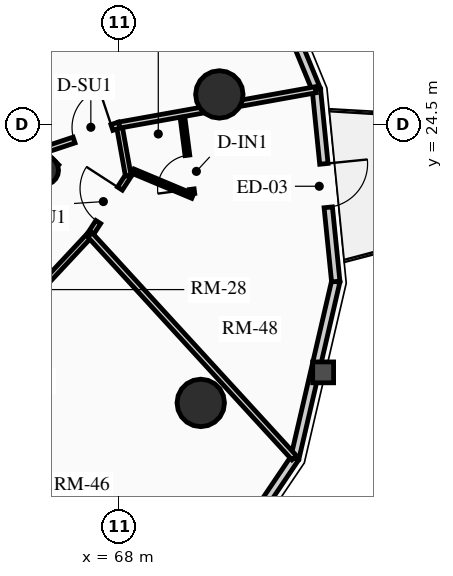
"""IFC4 building model, lengths in metres.
Left out: names, types, materials, properties, quantities, classifications, styles, units other than length and angle.
Written with IfcOpenShell. Run it as: python <this file> out.ifc"""

import sys

from ifc_helpers import new_model, si_unit, direction, frame, frame_2d, origin, origin_2d, place, context, subcontext, project, spatial, rectangle, circle, hollow_circle, extrude, source, transform, mapped, element, fill, save


model = new_model("IFC4")
c1 = context("Model", 3, precision=1e-05, world=origin(), true_north=direction((0.0, 1.0)))
c2 = subcontext(c1, "Body", "Model", "MODEL_VIEW")
j1 = project(units=[si_unit("LENGTHUNIT", "METRE"), si_unit("PLANEANGLEUNIT", "RADIAN")], contexts=[c1])
p1 = place(None, origin())
s1 = spatial("IfcSite", under=j1, at=p1, CompositionType="ELEMENT")
p2 = place(p1, origin())
s2 = spatial("IfcBuilding", under=s1, at=p2, CompositionType="ELEMENT")
p3 = place(p2, frame((0.0, 0.0, 154.51)))
s3 = spatial("IfcBuildingStorey", under=s2, at=p3, CompositionType="ELEMENT", Elevation=154.51)
p4 = place(p3, frame((66.268, 23.298, 0.0), z_axis=(0.0, 0.0, 1.0), x_axis=(-0.707106781187, 0.707106781187, 0.0)))
e1 = element("IfcWall", 1, at=p4, inside=s3, PredefinedType="SHEAR", context=c2, shape_type="SweptSolid", body=[
    extrude(rectangle(XDim=14.1, YDim=0.4, at=frame_2d((7.05, 0.0))), origin(), (0.0, 0.0, 1.0), 2.91),
])
p5 = place(p3, frame((58.561, 15.873, 0.0), z_axis=(0.0, 0.0, 1.0), x_axis=(0.707106781187, 0.707106781187, 0.0)))
e2 = element("IfcWall", 2, at=p5, inside=s3, PredefinedType="SHEAR", context=c2, shape_type="SweptSolid", body=[
    extrude(rectangle(XDim=10.7, YDim=0.4, at=frame_2d((5.35, 0.0))), origin(), (0.0, 0.0, 1.0), 2.91),
])
m1 = source(origin(), c2, "Body", "SweptSolid", [
    extrude(rectangle(XDim=1.5, YDim=2.02, at=frame_2d((0.75, 1.01))), frame((0.0, 0.21, 0.0), z_axis=(0.0, -1.0, 0.0), x_axis=(1.0, 0.0, 0.0)), (0.0, 0.0, 1.0), 0.42),
])
p6 = place(p5, frame((5.45, 0.0, 0.0)))
e3 = element("IfcOpeningElement", 3, at=p6, cuts=e2, PredefinedType="OPENING", context=c2, shape_type="MappedRepresentation", body=[
    mapped(m1, transform((0.0, 0.0, 0.0), x_axis=(1.0, 0.0, 0.0), y_axis=(0.0, 1.0, 0.0), z_axis=(0.0, 0.0, 1.0), scale=1.0)),
])
p7 = place(p3, frame((66.024, 23.294, 0.0), z_axis=(0.0, 0.0, 1.0), x_axis=(0.707106781187, 0.707106781187, 0.0)))
e4 = element("IfcColumn", 4, at=p7, inside=s3, PredefinedType="COLUMN", context=c2, shape_type="SweptSolid", body=[
    extrude(hollow_circle(Radius=0.38, WallThickness=0.032, at=origin_2d()), origin(), (0.0, 0.0, 1.0), 2.91),
])
for number, where, z_axis, x_axis in (
    (5, (70.146, 17.173, 0.0), (0.0, 0.0, 1.0), (1.0, 0.0, 0.0)),
    (6, (70.635, 25.291, 0.0), (0.0, 0.0, 1.0), (1.0, 0.0, 0.0)),
):
    element("IfcColumn", number, at=place(p3, frame(where, z_axis=z_axis, x_axis=x_axis)), inside=s3, PredefinedType="USERDEFINED", context=c2, shape_type="SweptSolid", body=[
        extrude(circle(Radius=0.625, at=origin_2d()), origin(), (0.0, 0.0, 1.0), 2.91),
    ])
p8 = place(p3, frame((72.622, 15.721, 0.0), z_axis=(0.0, 0.0, 1.0), x_axis=(-0.559635286042, -0.828739009952, 0.0)))
e7 = element("IfcWall", 7, at=p8, inside=s3, PredefinedType="SOLIDWALL", context=c2, shape_type="SweptSolid", body=[
    extrude(rectangle(XDim=4.569, YDim=0.22, at=frame_2d((2.284, 0.0))), origin(), (0.0, 0.0, 1.0), 2.245),
])
m2 = source(origin(), c2, "Body", "SweptSolid", [
    extrude(rectangle(XDim=1.6, YDim=1.3, at=frame_2d((0.8, 0.65))), frame((0.0, 0.12, 0.0), z_axis=(0.0, -1.0, 0.0), x_axis=(1.0, 0.0, 0.0)), (0.0, 0.0, 1.0), 0.24),
])
p9 = place(p8, frame((1.484, 0.0, 0.65)))
e8 = element("IfcOpeningElement", 8, at=p9, cuts=e7, PredefinedType="OPENING", context=c2, shape_type="MappedRepresentation", body=[
    mapped(m2, transform((0.0, 0.0, 0.0), x_axis=(1.0, 0.0, 0.0), y_axis=(0.0, 1.0, 0.0), z_axis=(0.0, 0.0, 1.0), scale=1.0)),
])
p10 = place(p3, frame((73.698, 20.367, 0.0), z_axis=(0.0, 0.0, 1.0), x_axis=(-0.225659540039, -0.974206226622, 0.0)))
e9 = element("IfcWall", 9, at=p10, inside=s3, PredefinedType="SOLIDWALL", context=c2, shape_type="SweptSolid", body=[
    extrude(rectangle(XDim=4.769, YDim=0.22, at=frame_2d((2.385, 0.0))), origin(), (0.0, 0.0, 1.0), 2.245),
])
p11 = place(p3, frame((73.189, 25.418, 0.0), z_axis=(0.0, 0.0, 1.0), x_axis=(0.100279889424, -0.994959267396, 0.0)))
e10 = element("IfcWall", 10, at=p11, inside=s3, PredefinedType="SOLIDWALL", context=c2, shape_type="SweptSolid", body=[
    extrude(rectangle(XDim=5.076, YDim=0.22, at=frame_2d((2.538, 0.0))), origin(), (0.0, 0.0, 1.0), 2.245),
])
m3 = source(origin(), c2, "Body", "SweptSolid", [
    extrude(rectangle(XDim=1.15, YDim=2.005, at=frame_2d((0.575, 1.002))), frame((0.0, 0.12, 0.0), z_axis=(0.0, -1.0, 0.0), x_axis=(1.0, 0.0, 0.0)), (0.0, 0.0, 1.0), 0.24),
])
p12 = place(p11, frame((1.963, 0.0, 0.0)))
e11 = element("IfcOpeningElement", 11, at=p12, cuts=e10, PredefinedType="OPENING", context=c2, shape_type="MappedRepresentation", body=[
    mapped(m3, transform((0.0, 0.0, 0.0), x_axis=(1.0, 0.0, 0.0), y_axis=(0.0, 1.0, 0.0), z_axis=(0.0, 0.0, 1.0), scale=1.0)),
])
p13 = place(p3, frame((71.144, 30.378, 0.0), z_axis=(0.0, 0.0, 1.0), x_axis=(0.38111364655, -0.924528197738, 0.0)))
e12 = element("IfcWall", 12, at=p13, inside=s3, PredefinedType="SOLIDWALL", context=c2, shape_type="SweptSolid", body=[
    extrude(rectangle(XDim=5.366, YDim=0.22, at=frame_2d((2.683, 0.0))), origin(), (0.0, 0.0, 1.0), 2.245),
])
p14 = place(p3, frame((62.784, 16.83, 0.0), z_axis=(0.0, 0.0, 1.0), x_axis=(0.682240832942, 0.731127516831, 0.0)))
e13 = element("IfcWall", 13, at=p14, inside=s3, PredefinedType="PARTITIONING", context=c2, shape_type="SweptSolid", body=[
    extrude(rectangle(XDim=6.517, YDim=0.15, at=frame_2d((3.259, 0.0))), origin(), (0.0, 0.0, 1.0), 2.245),
])
m4 = source(origin(), c2, "Body", "SweptSolid", [
    extrude(rectangle(XDim=1.05, YDim=2.015, at=frame_2d((0.525, 1.007))), frame((0.0, 0.085, 0.0), z_axis=(0.0, -1.0, 0.0), x_axis=(1.0, 0.0, 0.0)), (0.0, 0.0, 1.0), 0.17),
])
p15 = place(p14, frame((2.734, 0.0, 0.0)))
e14 = element("IfcOpeningElement", 14, at=p15, cuts=e13, PredefinedType="OPENING", context=c2, shape_type="MappedRepresentation", body=[
    mapped(m4, transform((0.0, 0.0, 0.0), x_axis=(1.0, 0.0, 0.0), y_axis=(0.0, 1.0, 0.0), z_axis=(0.0, 0.0, 1.0), scale=1.0)),
])
p16 = place(p3, frame((67.23, 21.595, 0.0), z_axis=(0.0, 0.0, 1.0), x_axis=(0.543687770222, 0.839287560084, 0.0)))
e15 = element("IfcWall", 15, at=p16, inside=s3, PredefinedType="PARTITIONING", context=c2, shape_type="SweptSolid", body=[
    extrude(rectangle(XDim=1.855, YDim=0.15, at=frame_2d((0.927, 0.0))), origin(), (0.0, 0.0, 1.0), 2.245),
])
p17 = place(p16, frame((0.402, 0.0, 0.0)))
e16 = element("IfcOpeningElement", 16, at=p17, cuts=e15, PredefinedType="OPENING", context=c2, shape_type="MappedRepresentation", body=[
    mapped(m4, transform((0.0, 0.0, 0.0), x_axis=(1.0, 0.0, 0.0), y_axis=(0.0, 1.0, 0.0), z_axis=(0.0, 0.0, 1.0), scale=1.0)),
])
p18 = place(p3, frame((68.239, 23.152, 0.0), z_axis=(0.0, 0.0, 1.0), x_axis=(-0.177076146115, 0.984197154272, 0.0)))
e17 = element("IfcWall", 17, at=p18, inside=s3, PredefinedType="PARTITIONING", context=c2, shape_type="SweptSolid", body=[
    extrude(rectangle(XDim=1.354, YDim=0.15, at=frame_2d((0.677, 0.0))), origin(), (0.0, 0.0, 1.0), 2.245),
])
p19 = place(p3, frame((67.23, 21.595, 0.0), z_axis=(0.0, 0.0, 1.0), x_axis=(0.67560509773, -0.737263692258, 0.0)))
e18 = element("IfcWall", 18, at=p19, inside=s3, PredefinedType="PARTITIONING", context=c2, shape_type="SweptSolid", body=[
    extrude(rectangle(XDim=7.955, YDim=0.16, at=frame_2d((3.978, 0.0))), origin(), (0.0, 0.0, 1.0), 2.245),
])
p20 = place(p3, frame((67.999, 24.485, 0.0), z_axis=(0.0, 0.0, 1.0), x_axis=(0.984209402602, 0.177008055834, 0.0)))
e19 = element("IfcWall", 19, at=p20, inside=s3, PredefinedType="PARTITIONING", context=c2, shape_type="SweptSolid", body=[
    extrude(rectangle(XDim=5.254, YDim=0.16, at=frame_2d((2.627, 0.0))), origin(), (0.0, 0.0, 1.0), 2.245),
])
p21 = place(p3, frame((66.021, 23.828, 0.0), z_axis=(0.0, 0.0, 1.0), x_axis=(0.949104122534, 0.314962481241, 0.0)))
e20 = element("IfcWall", 20, at=p21, inside=s3, PredefinedType="PARTITIONING", context=c2, shape_type="SweptSolid", body=[
    extrude(rectangle(XDim=2.084, YDim=0.16, at=frame_2d((1.042, 0.0))), origin(), (0.0, 0.0, 1.0), 2.245),
])
m5 = source(origin(), c2, "Body", "SweptSolid", [
    extrude(rectangle(XDim=1.05, YDim=2.015, at=frame_2d((0.525, 1.007))), frame((0.0, 0.09, 0.0), z_axis=(0.0, -1.0, 0.0), x_axis=(1.0, 0.0, 0.0)), (0.0, 0.0, 1.0), 0.18),
])
p22 = place(p21, frame((0.834, 0.0, 0.0)))
e21 = element("IfcOpeningElement", 21, at=p22, cuts=e20, PredefinedType="OPENING", context=c2, shape_type="MappedRepresentation", body=[
    mapped(m5, transform((0.0, 0.0, 0.0), x_axis=(1.0, 0.0, 0.0), y_axis=(0.0, 1.0, 0.0), z_axis=(0.0, 0.0, 1.0), scale=1.0)),
])
p23 = place(p3, frame((68.367, 23.271, 0.0), z_axis=(0.0, 0.0, 1.0), x_axis=(0.922420747941, -0.386186436541, 0.0)))
e22 = element("IfcWall", 22, at=p23, inside=s3, PredefinedType="PARTITIONING", context=c2, shape_type="SweptSolid", body=[
    extrude(rectangle(XDim=1.699, YDim=0.125, at=frame_2d((0.849, 0.0))), origin(), (0.0, 0.0, 1.0), 2.675),
])
p24 = place(p3, frame((69.926, 22.678, 0.0), z_axis=(0.0, 0.0, 1.0), x_axis=(-0.128245661315, 0.991742431458, 0.0)))
e23 = element("IfcWall", 23, at=p24, inside=s3, PredefinedType="PARTITIONING", context=c2, shape_type="SweptSolid", body=[
    extrude(rectangle(XDim=2.033, YDim=0.125, at=frame_2d((1.017, 0.0))), origin(), (0.0, 0.0, 1.0), 2.675),
])
m6 = source(origin(), c2, "Body", "SweptSolid", [
    extrude(rectangle(XDim=0.9, YDim=2.005, at=frame_2d((0.45, 1.002))), frame((0.0, 0.073, 0.0), z_axis=(0.0, -1.0, 0.0), x_axis=(1.0, 0.0, 0.0)), (0.0, 0.0, 1.0), 0.145),
])
p25 = place(p24, frame((0.12, 0.0, 0.0)))
e24 = element("IfcOpeningElement", 24, at=p25, cuts=e23, PredefinedType="OPENING", context=c2, shape_type="MappedRepresentation", body=[
    mapped(m6, transform((0.0, 0.0, 0.0), x_axis=(1.0, 0.0, 0.0), y_axis=(0.0, 1.0, 0.0), z_axis=(0.0, 0.0, 1.0), scale=1.0)),
])
m7 = source(origin(), c2, "Body", "SweptSolid", [
    extrude(rectangle(XDim=1.15, YDim=2.005, at=frame_2d((0.575, 1.002))), frame((0.0, 0.025, 0.0), z_axis=(0.0, -1.0, 0.0), x_axis=(1.0, 0.0, 0.0)), (0.0, 0.0, 1.0), 0.05),
])
p26 = place(p12, origin())
e25 = element("IfcDoor", 25, at=p26, inside=s3, OperationType="SINGLE_SWING_LEFT", PredefinedType="DOOR", context=c2, shape_type="MappedRepresentation", body=[
    mapped(m7, transform((0.0, 0.0, 0.0), x_axis=(1.0, 0.0, 0.0), y_axis=(0.0, 1.0, 0.0), z_axis=(0.0, 0.0, 1.0), scale=1.0)),
])
fill(e11, e25)
m8 = source(origin(), c2, "Body", "SweptSolid", [
    extrude(rectangle(XDim=1.05, YDim=2.015, at=frame_2d((0.525, 1.007))), frame((0.0, 0.025, 0.0), z_axis=(0.0, -1.0, 0.0), x_axis=(1.0, 0.0, 0.0)), (0.0, 0.0, 1.0), 0.05),
])
p27 = place(p22, origin())
e26 = element("IfcDoor", 26, at=p27, inside=s3, OperationType="SINGLE_SWING_RIGHT", PredefinedType="DOOR", context=c2, shape_type="MappedRepresentation", body=[
    mapped(m8, transform((0.0, 0.0, 0.0), x_axis=(1.0, 0.0, 0.0), y_axis=(0.0, 1.0, 0.0), z_axis=(0.0, 0.0, 1.0), scale=1.0)),
])
fill(e21, e26)
p28 = place(p17, origin())
e27 = element("IfcDoor", 27, at=p28, inside=s3, OperationType="SINGLE_SWING_RIGHT", PredefinedType="DOOR", context=c2, shape_type="MappedRepresentation", body=[
    mapped(m8, transform((0.0, 0.0, 0.0), x_axis=(1.0, 0.0, 0.0), y_axis=(0.0, 1.0, 0.0), z_axis=(0.0, 0.0, 1.0), scale=1.0)),
])
fill(e16, e27)
m9 = source(origin(), c2, "Body", "SweptSolid", [
    extrude(rectangle(XDim=0.9, YDim=2.005, at=frame_2d((0.45, 1.002))), frame((0.0, 0.025, 0.0), z_axis=(0.0, -1.0, 0.0), x_axis=(1.0, 0.0, 0.0)), (0.0, 0.0, 1.0), 0.05),
])
p29 = place(p25, origin())
e28 = element("IfcDoor", 28, at=p29, inside=s3, OperationType="SINGLE_SWING_LEFT", PredefinedType="DOOR", context=c2, shape_type="MappedRepresentation", body=[
    mapped(m9, transform((0.0, 0.0, 0.0), x_axis=(1.0, 0.0, 0.0), y_axis=(0.0, 1.0, 0.0), z_axis=(0.0, 0.0, 1.0), scale=1.0)),
])
fill(e24, e28)
save(model, sys.argv[1])
